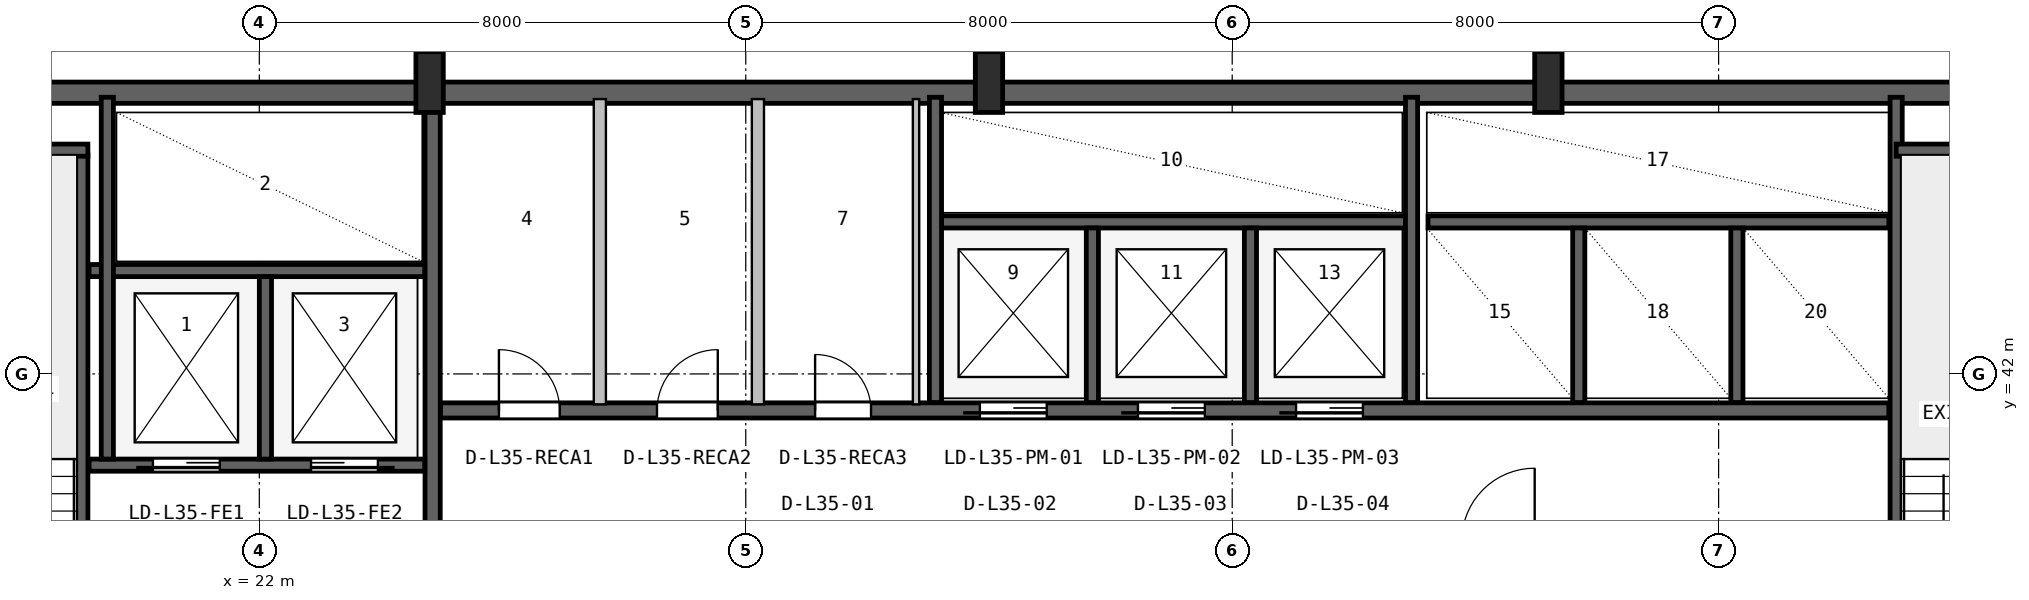
"""IFC4 building model, lengths in metres.
Left out: names, types, materials, properties, quantities, classifications, styles, units other than length and angle.
Written with IfcOpenShell. Run it as: python <this file> out.ifc"""

import sys

from ifc_helpers import new_model, si_unit, direction, frame, frame_2d, origin, origin_2d, place, context, subcontext, project, spatial, rectangle, i_section, extrude, source, transform, mapped, element, fill, save


model = new_model("IFC4")
c1 = context("Model", 3, precision=1e-05, world=origin(), true_north=direction((0.0, 1.0)))
c2 = subcontext(c1, "Body", "Model", "MODEL_VIEW")
j1 = project(units=[si_unit("LENGTHUNIT", "METRE"), si_unit("PLANEANGLEUNIT", "RADIAN")], contexts=[c1])
p1 = place(None, origin())
s1 = spatial("IfcSite", under=j1, at=p1, CompositionType="ELEMENT")
p2 = place(p1, origin())
s2 = spatial("IfcBuilding", under=s1, at=p2, CompositionType="ELEMENT")
p3 = place(p2, frame((0.0, 0.0, 145.8)))
s3 = spatial("IfcBuildingStorey", under=s2, at=p3, CompositionType="ELEMENT", Elevation=145.8)
p4 = place(p3, frame((15.6, 46.625, 0.0), z_axis=(0.0, 0.0, 1.0), x_axis=(1.0, 0.0, 0.0)))
e1 = element("IfcWall", 1, at=p4, inside=s3, PredefinedType="SHEAR", context=c2, shape_type="SweptSolid", body=[
    extrude(rectangle(XDim=36.8, YDim=0.35, at=frame_2d((18.4, 0.0))), origin(), (0.0, 0.0, 1.0), 3.55),
])
m1 = source(origin(), c2, "Body", "SweptSolid", [
    extrude(i_section(OverallWidth=0.45, OverallDepth=1.0, WebThickness=0.016, FlangeThickness=0.03, FilletRadius=0.016, at=origin_2d()), origin(), (0.0, 0.0, 1.0), 3.8),
])
for number, where, z_axis, x_axis in (
    (2, (24.8, 46.8, 0.0), (0.0, 0.0, 1.0), (1.0, 0.0, 0.0)),
    (3, (34.0, 46.8, 0.0), (0.0, 0.0, 1.0), (1.0, 0.0, 0.0)),
    (4, (43.2, 46.8, 0.0), (0.0, 0.0, 1.0), (1.0, 0.0, 0.0)),
):
    element("IfcColumn", number, at=place(p3, frame(where, z_axis=z_axis, x_axis=x_axis)), inside=s3, PredefinedType="COLUMN", context=c2, shape_type="MappedRepresentation", body=[
        mapped(m1, transform((0.0, 0.0, 0.0), x_axis=(1.0, 0.0, 0.0), y_axis=(0.0, 1.0, 0.0), z_axis=(0.0, 0.0, 1.0), scale=1.0)),
    ])
p5 = place(p3, frame((19.08, 35.95, 0.0), z_axis=(0.0, 0.0, 1.0), x_axis=(0.0, 1.0, 0.0)))
e5 = element("IfcWall", 5, at=p5, inside=s3, PredefinedType="SHEAR", context=c2, shape_type="SweptSolid", body=[
    extrude(rectangle(XDim=9.65, YDim=0.2, at=frame_2d((4.825, 0.0))), origin(), (0.0, 0.0, 1.0), 3.55),
])
p6 = place(p5, frame((0.25, 0.0, 0.0)))
e6 = element("IfcOpeningElement", 6, at=p6, cuts=e5, PredefinedType="OPENING", context=c2, shape_type="SweptSolid", body=[
    extrude(rectangle(XDim=0.95, YDim=2.1, at=frame_2d((0.475, 1.05))), frame((0.0, 0.11, 0.0), z_axis=(0.0, -1.0, 0.0), x_axis=(1.0, 0.0, 0.0)), (0.0, 0.0, 1.0), 0.22),
])
p7 = place(p3, frame((15.95, 45.68, 0.0), z_axis=(0.0, 0.0, 1.0), x_axis=(1.0, 0.0, 0.0)))
e7 = element("IfcWall", 7, at=p7, inside=s3, PredefinedType="SHEAR", context=c2, shape_type="SweptSolid", body=[
    extrude(rectangle(XDim=3.23, YDim=0.2, at=frame_2d((1.615, 0.0))), origin(), (0.0, 0.0, 1.0), 3.55),
])
p8 = place(p3, frame((24.85, 36.05, 0.0), z_axis=(0.0, 0.0, 1.0), x_axis=(0.0, 1.0, 0.0)))
e8 = element("IfcWall", 8, at=p8, inside=s3, PredefinedType="SHEAR", context=c2, shape_type="SweptSolid", body=[
    extrude(rectangle(XDim=10.45, YDim=0.25, at=frame_2d((5.225, 0.0))), origin(), (0.0, 0.0, 1.0), 3.55),
])
p9 = place(p3, frame((19.2, 40.5, 0.0), z_axis=(0.0, 0.0, 1.0), x_axis=(1.0, 0.0, 0.0)))
e9 = element("IfcWall", 9, at=p9, inside=s3, PredefinedType="SHEAR", context=c2, shape_type="SweptSolid", body=[
    extrude(rectangle(XDim=5.52, YDim=0.2, at=frame_2d((2.76, 0.0))), origin(), (0.0, 0.0, 1.0), 3.55),
])
p10 = place(p9, frame((1.05, 0.0, 0.0)))
e10 = element("IfcOpeningElement", 10, at=p10, cuts=e9, PredefinedType="OPENING", context=c2, shape_type="SweptSolid", body=[
    extrude(rectangle(XDim=1.1, YDim=2.18, at=frame_2d((0.55, 1.09))), frame((0.0, 0.11, 0.0), z_axis=(0.0, -1.0, 0.0), x_axis=(1.0, 0.0, 0.0)), (0.0, 0.0, 1.0), 0.22),
])
p11 = place(p9, frame((3.65, 0.0, 0.0)))
e11 = element("IfcOpeningElement", 11, at=p11, cuts=e9, PredefinedType="OPENING", context=c2, shape_type="SweptSolid", body=[
    extrude(rectangle(XDim=1.1, YDim=2.18, at=frame_2d((0.55, 1.09))), frame((0.0, 0.11, 0.0), z_axis=(0.0, -1.0, 0.0), x_axis=(1.0, 0.0, 0.0)), (0.0, 0.0, 1.0), 0.22),
])
p12 = place(p3, frame((19.2, 43.7, 0.0), z_axis=(0.0, 0.0, 1.0), x_axis=(1.0, 0.0, 0.0)))
e12 = element("IfcWall", 12, at=p12, inside=s3, PredefinedType="SHEAR", context=c2, shape_type="SweptSolid", body=[
    extrude(rectangle(XDim=5.52, YDim=0.2, at=frame_2d((2.76, 0.0))), origin(), (0.0, 0.0, 1.0), 3.55),
])
p13 = place(p3, frame((22.1, 40.6, 0.0), z_axis=(0.0, 0.0, 1.0), x_axis=(0.0, 1.0, 0.0)))
e13 = element("IfcWall", 13, at=p13, inside=s3, PredefinedType="SHEAR", context=c2, shape_type="SweptSolid", body=[
    extrude(rectangle(XDim=3.0, YDim=0.2, at=frame_2d((1.5, 0.0))), origin(), (0.0, 0.0, 1.0), 3.55),
])
p14 = place(p3, frame((19.5, 40.6, 0.0), z_axis=(0.0, 0.0, 1.0), x_axis=(0.0, 1.0, 0.0)))
e14 = element("IfcWall", 14, at=p14, inside=s3, PredefinedType="SHEAR", context=c2, shape_type="SweptSolid", body=[
    extrude(rectangle(XDim=5.95, YDim=0.2, at=frame_2d((2.975, 0.0))), origin(), (0.0, 0.0, 1.0), 3.55),
])
p15 = place(p3, frame((48.92, 36.05, 0.0), z_axis=(0.0, 0.0, 1.0), x_axis=(0.0, 1.0, 0.0)))
e15 = element("IfcWall", 15, at=p15, inside=s3, PredefinedType="SHEAR", context=c2, shape_type="SweptSolid", body=[
    extrude(rectangle(XDim=10.5, YDim=0.2, at=frame_2d((5.25, 0.0))), origin(), (0.0, 0.0, 1.0), 3.55),
])
p16 = place(p3, frame((48.92, 45.68, 0.0), z_axis=(0.0, 0.0, 1.0), x_axis=(1.0, 0.0, 0.0)))
e16 = element("IfcWall", 16, at=p16, inside=s3, PredefinedType="SHEAR", context=c2, shape_type="SweptSolid", body=[
    extrude(rectangle(XDim=3.18, YDim=0.2, at=frame_2d((1.59, 0.0))), origin(), (0.0, 0.0, 1.0), 3.55),
])
p17 = place(p3, frame((24.98, 41.4, 0.0), z_axis=(0.0, 0.0, 1.0), x_axis=(1.0, 0.0, 0.0)))
e17 = element("IfcWall", 17, at=p17, inside=s3, PredefinedType="SHEAR", context=c2, shape_type="SweptSolid", body=[
    extrude(rectangle(XDim=23.82, YDim=0.25, at=frame_2d((11.91, 0.0))), origin(), (0.0, 0.0, 1.0), 3.55),
])
p18 = place(p17, frame((8.87, 0.0, 0.0)))
e18 = element("IfcOpeningElement", 18, at=p18, cuts=e17, PredefinedType="OPENING", context=c2, shape_type="SweptSolid", body=[
    extrude(rectangle(XDim=1.1, YDim=2.18, at=frame_2d((0.55, 1.09))), frame((0.0, 0.135, 0.0), z_axis=(0.0, -1.0, 0.0), x_axis=(1.0, 0.0, 0.0)), (0.0, 0.0, 1.0), 0.27),
])
p19 = place(p17, frame((11.47, 0.0, 0.0)))
e19 = element("IfcOpeningElement", 19, at=p19, cuts=e17, PredefinedType="OPENING", context=c2, shape_type="SweptSolid", body=[
    extrude(rectangle(XDim=1.1, YDim=2.18, at=frame_2d((0.55, 1.09))), frame((0.0, 0.135, 0.0), z_axis=(0.0, -1.0, 0.0), x_axis=(1.0, 0.0, 0.0)), (0.0, 0.0, 1.0), 0.27),
])
p20 = place(p17, frame((14.07, 0.0, 0.0)))
e20 = element("IfcOpeningElement", 20, at=p20, cuts=e17, PredefinedType="OPENING", context=c2, shape_type="SweptSolid", body=[
    extrude(rectangle(XDim=1.1, YDim=2.18, at=frame_2d((0.55, 1.09))), frame((0.0, 0.135, 0.0), z_axis=(0.0, -1.0, 0.0), x_axis=(1.0, 0.0, 0.0)), (0.0, 0.0, 1.0), 0.27),
])
p21 = place(p17, frame((0.96, 0.0, 0.0)))
e21 = element("IfcOpeningElement", 21, at=p21, cuts=e17, PredefinedType="OPENING", context=c2, shape_type="SweptSolid", body=[
    extrude(rectangle(XDim=1.0, YDim=2.08, at=frame_2d((0.5, 1.04))), frame((0.0, 0.135, 0.0), z_axis=(0.0, -1.0, 0.0), x_axis=(1.0, 0.0, 0.0)), (0.0, 0.0, 1.0), 0.27),
])
p22 = place(p17, frame((3.56, 0.0, 0.0)))
e22 = element("IfcOpeningElement", 22, at=p22, cuts=e17, PredefinedType="OPENING", context=c2, shape_type="SweptSolid", body=[
    extrude(rectangle(XDim=1.0, YDim=2.08, at=frame_2d((0.5, 1.04))), frame((0.0, 0.135, 0.0), z_axis=(0.0, -1.0, 0.0), x_axis=(1.0, 0.0, 0.0)), (0.0, 0.0, 1.0), 0.27),
])
p23 = place(p17, frame((6.16, 0.0, 0.0)))
e23 = element("IfcOpeningElement", 23, at=p23, cuts=e17, PredefinedType="OPENING", context=c2, shape_type="SweptSolid", body=[
    extrude(rectangle(XDim=0.92, YDim=2.08, at=frame_2d((0.46, 1.04))), frame((0.0, 0.135, 0.0), z_axis=(0.0, -1.0, 0.0), x_axis=(1.0, 0.0, 0.0)), (0.0, 0.0, 1.0), 0.27),
])
p24 = place(p3, frame((33.22, 44.5, 0.0), z_axis=(0.0, 0.0, 1.0), x_axis=(1.0, 0.0, 0.0)))
e24 = element("IfcWall", 24, at=p24, inside=s3, PredefinedType="SHEAR", context=c2, shape_type="SweptSolid", body=[
    extrude(rectangle(XDim=7.63, YDim=0.2, at=frame_2d((3.815, 0.0))), origin(), (0.0, 0.0, 1.0), 3.55),
])
p25 = place(p3, frame((33.12, 41.53, 0.0), z_axis=(0.0, 0.0, 1.0), x_axis=(0.0, 1.0, 0.0)))
e25 = element("IfcWall", 25, at=p25, inside=s3, PredefinedType="SHEAR", context=c2, shape_type="SweptSolid", body=[
    extrude(rectangle(XDim=5.02, YDim=0.2, at=frame_2d((2.51, 0.0))), origin(), (0.0, 0.0, 1.0), 3.55),
])
for number, where, z_axis, x_axis in (
    (26, (35.7, 41.53, 0.0), (0.0, 0.0, 1.0), (0.0, 1.0, 0.0)),
    (27, (38.3, 41.53, 0.0), (0.0, 0.0, 1.0), (0.0, 1.0, 0.0)),
):
    element("IfcWall", number, at=place(p3, frame(where, z_axis=z_axis, x_axis=x_axis)), inside=s3, PredefinedType="SHEAR", context=c2, shape_type="SweptSolid", body=[
        extrude(rectangle(XDim=2.87, YDim=0.2, at=frame_2d((1.435, 0.0))), origin(), (0.0, 0.0, 1.0), 3.55),
    ])
p26 = place(p3, frame((40.95, 41.53, 0.0), z_axis=(0.0, 0.0, 1.0), x_axis=(0.0, 1.0, 0.0)))
e28 = element("IfcWall", 28, at=p26, inside=s3, PredefinedType="SHEAR", context=c2, shape_type="SweptSolid", body=[
    extrude(rectangle(XDim=5.02, YDim=0.2, at=frame_2d((2.51, 0.0))), origin(), (0.0, 0.0, 1.0), 3.55),
])
p27 = place(p3, frame((41.22, 44.5, 0.0), z_axis=(0.0, 0.0, 1.0), x_axis=(1.0, 0.0, 0.0)))
e29 = element("IfcWall", 29, at=p27, inside=s3, PredefinedType="SHEAR", context=c2, shape_type="SweptSolid", body=[
    extrude(rectangle(XDim=7.58, YDim=0.2, at=frame_2d((3.79, 0.0))), origin(), (0.0, 0.0, 1.0), 3.55),
])
for number, where, z_axis, x_axis in (
    (30, (43.7, 41.53, 0.0), (0.0, 0.0, 1.0), (0.0, 1.0, 0.0)),
    (31, (46.3, 41.53, 0.0), (0.0, 0.0, 1.0), (0.0, 1.0, 0.0)),
):
    element("IfcWall", number, at=place(p3, frame(where, z_axis=z_axis, x_axis=x_axis)), inside=s3, PredefinedType="SHEAR", context=c2, shape_type="SweptSolid", body=[
        extrude(rectangle(XDim=2.87, YDim=0.2, at=frame_2d((1.435, 0.0))), origin(), (0.0, 0.0, 1.0), 3.55),
    ])
for number, where, z_axis, x_axis in (
    (32, (27.6, 41.5, 0.0), (0.0, 0.0, 1.0), (0.0, 1.0, 0.0)),
    (33, (30.2, 41.5, 0.0), (0.0, 0.0, 1.0), (0.0, 1.0, 0.0)),
):
    element("IfcWall", number, at=place(p3, frame(where, z_axis=z_axis, x_axis=x_axis)), inside=s3, PredefinedType="SOLIDWALL", context=c2, shape_type="SweptSolid", body=[
        extrude(rectangle(XDim=5.02, YDim=0.2, at=frame_2d((2.51, 0.0))), origin(), (0.0, 0.0, 1.0), 3.53),
    ])
p28 = place(p3, frame((32.8, 41.5, 0.0), z_axis=(0.0, 0.0, 1.0), x_axis=(0.0, 1.0, 0.0)))
e34 = element("IfcWall", 34, at=p28, inside=s3, PredefinedType="PARTITIONING", context=c2, shape_type="SweptSolid", body=[
    extrude(rectangle(XDim=5.02, YDim=0.105, at=frame_2d((2.51, 0.0))), origin(), (0.0, 0.0, 1.0), 3.53),
])
m2 = source(origin(), c2, "Body", "SweptSolid", [
    extrude(rectangle(XDim=1.1, YDim=2.18, at=frame_2d((0.55, 1.09))), frame((0.0, 0.025, 0.0), z_axis=(0.0, -1.0, 0.0), x_axis=(1.0, 0.0, 0.0)), (0.0, 0.0, 1.0), 0.05),
])
p29 = place(p10, frame((1.1, 0.0, 0.0), z_axis=(0.0, 0.0, 1.0), x_axis=(-1.0, 0.0, 0.0)))
e35 = element("IfcDoor", 35, at=p29, inside=s3, OperationType="SLIDING_TO_LEFT", PredefinedType="DOOR", context=c2, shape_type="MappedRepresentation", body=[
    mapped(m2, transform((0.0, 0.0, 0.0), x_axis=(1.0, 0.0, 0.0), y_axis=(0.0, 1.0, 0.0), z_axis=(0.0, 0.0, 1.0), scale=1.0)),
])
fill(e10, e35)
p30 = place(p11, frame((1.1, 0.0, 0.0), z_axis=(0.0, 0.0, 1.0), x_axis=(-1.0, 0.0, 0.0)))
e36 = element("IfcDoor", 36, at=p30, inside=s3, OperationType="SLIDING_TO_RIGHT", PredefinedType="DOOR", context=c2, shape_type="MappedRepresentation", body=[
    mapped(m2, transform((0.0, 0.0, 0.0), x_axis=(1.0, 0.0, 0.0), y_axis=(0.0, 1.0, 0.0), z_axis=(0.0, 0.0, 1.0), scale=1.0)),
])
fill(e11, e36)
p31 = place(p18, frame((1.1, 0.0, 0.0), z_axis=(0.0, 0.0, 1.0), x_axis=(-1.0, 0.0, 0.0)))
e37 = element("IfcDoor", 37, at=p31, inside=s3, OperationType="SLIDING_TO_LEFT", PredefinedType="DOOR", context=c2, shape_type="MappedRepresentation", body=[
    mapped(m2, transform((0.0, 0.0, 0.0), x_axis=(1.0, 0.0, 0.0), y_axis=(0.0, 1.0, 0.0), z_axis=(0.0, 0.0, 1.0), scale=1.0)),
])
fill(e18, e37)
p32 = place(p19, frame((1.1, 0.0, 0.0), z_axis=(0.0, 0.0, 1.0), x_axis=(-1.0, 0.0, 0.0)))
e38 = element("IfcDoor", 38, at=p32, inside=s3, OperationType="SLIDING_TO_LEFT", PredefinedType="DOOR", context=c2, shape_type="MappedRepresentation", body=[
    mapped(m2, transform((0.0, 0.0, 0.0), x_axis=(1.0, 0.0, 0.0), y_axis=(0.0, 1.0, 0.0), z_axis=(0.0, 0.0, 1.0), scale=1.0)),
])
fill(e19, e38)
p33 = place(p20, frame((1.1, 0.0, 0.0), z_axis=(0.0, 0.0, 1.0), x_axis=(-1.0, 0.0, 0.0)))
e39 = element("IfcDoor", 39, at=p33, inside=s3, OperationType="SLIDING_TO_LEFT", PredefinedType="DOOR", context=c2, shape_type="MappedRepresentation", body=[
    mapped(m2, transform((0.0, 0.0, 0.0), x_axis=(1.0, 0.0, 0.0), y_axis=(0.0, 1.0, 0.0), z_axis=(0.0, 0.0, 1.0), scale=1.0)),
])
fill(e20, e39)
m3 = source(origin(), c2, "Body", "SweptSolid", [
    extrude(rectangle(XDim=1.0, YDim=2.08, at=frame_2d((0.5, 1.04))), frame((0.0, 0.025, 0.0), z_axis=(0.0, -1.0, 0.0), x_axis=(1.0, 0.0, 0.0)), (0.0, 0.0, 1.0), 0.05),
])
p34 = place(p21, origin())
e40 = element("IfcDoor", 40, at=p34, inside=s3, OperationType="SINGLE_SWING_LEFT", PredefinedType="DOOR", context=c2, shape_type="MappedRepresentation", body=[
    mapped(m3, transform((0.0, 0.0, 0.0), x_axis=(1.0, 0.0, 0.0), y_axis=(0.0, 1.0, 0.0), z_axis=(0.0, 0.0, 1.0), scale=1.0)),
])
fill(e21, e40)
p35 = place(p22, origin())
e41 = element("IfcDoor", 41, at=p35, inside=s3, OperationType="SINGLE_SWING_RIGHT", PredefinedType="DOOR", context=c2, shape_type="MappedRepresentation", body=[
    mapped(m3, transform((0.0, 0.0, 0.0), x_axis=(1.0, 0.0, 0.0), y_axis=(0.0, 1.0, 0.0), z_axis=(0.0, 0.0, 1.0), scale=1.0)),
])
fill(e22, e41)
m4 = source(origin(), c2, "Body", "SweptSolid", [
    extrude(rectangle(XDim=0.92, YDim=2.08, at=frame_2d((0.46, 1.04))), frame((0.0, 0.025, 0.0), z_axis=(0.0, -1.0, 0.0), x_axis=(1.0, 0.0, 0.0)), (0.0, 0.0, 1.0), 0.05),
])
p36 = place(p23, origin())
e42 = element("IfcDoor", 42, at=p36, inside=s3, OperationType="SINGLE_SWING_LEFT", PredefinedType="DOOR", context=c2, shape_type="MappedRepresentation", body=[
    mapped(m4, transform((0.0, 0.0, 0.0), x_axis=(1.0, 0.0, 0.0), y_axis=(0.0, 1.0, 0.0), z_axis=(0.0, 0.0, 1.0), scale=1.0)),
])
fill(e23, e42)
save(model, sys.argv[1])
